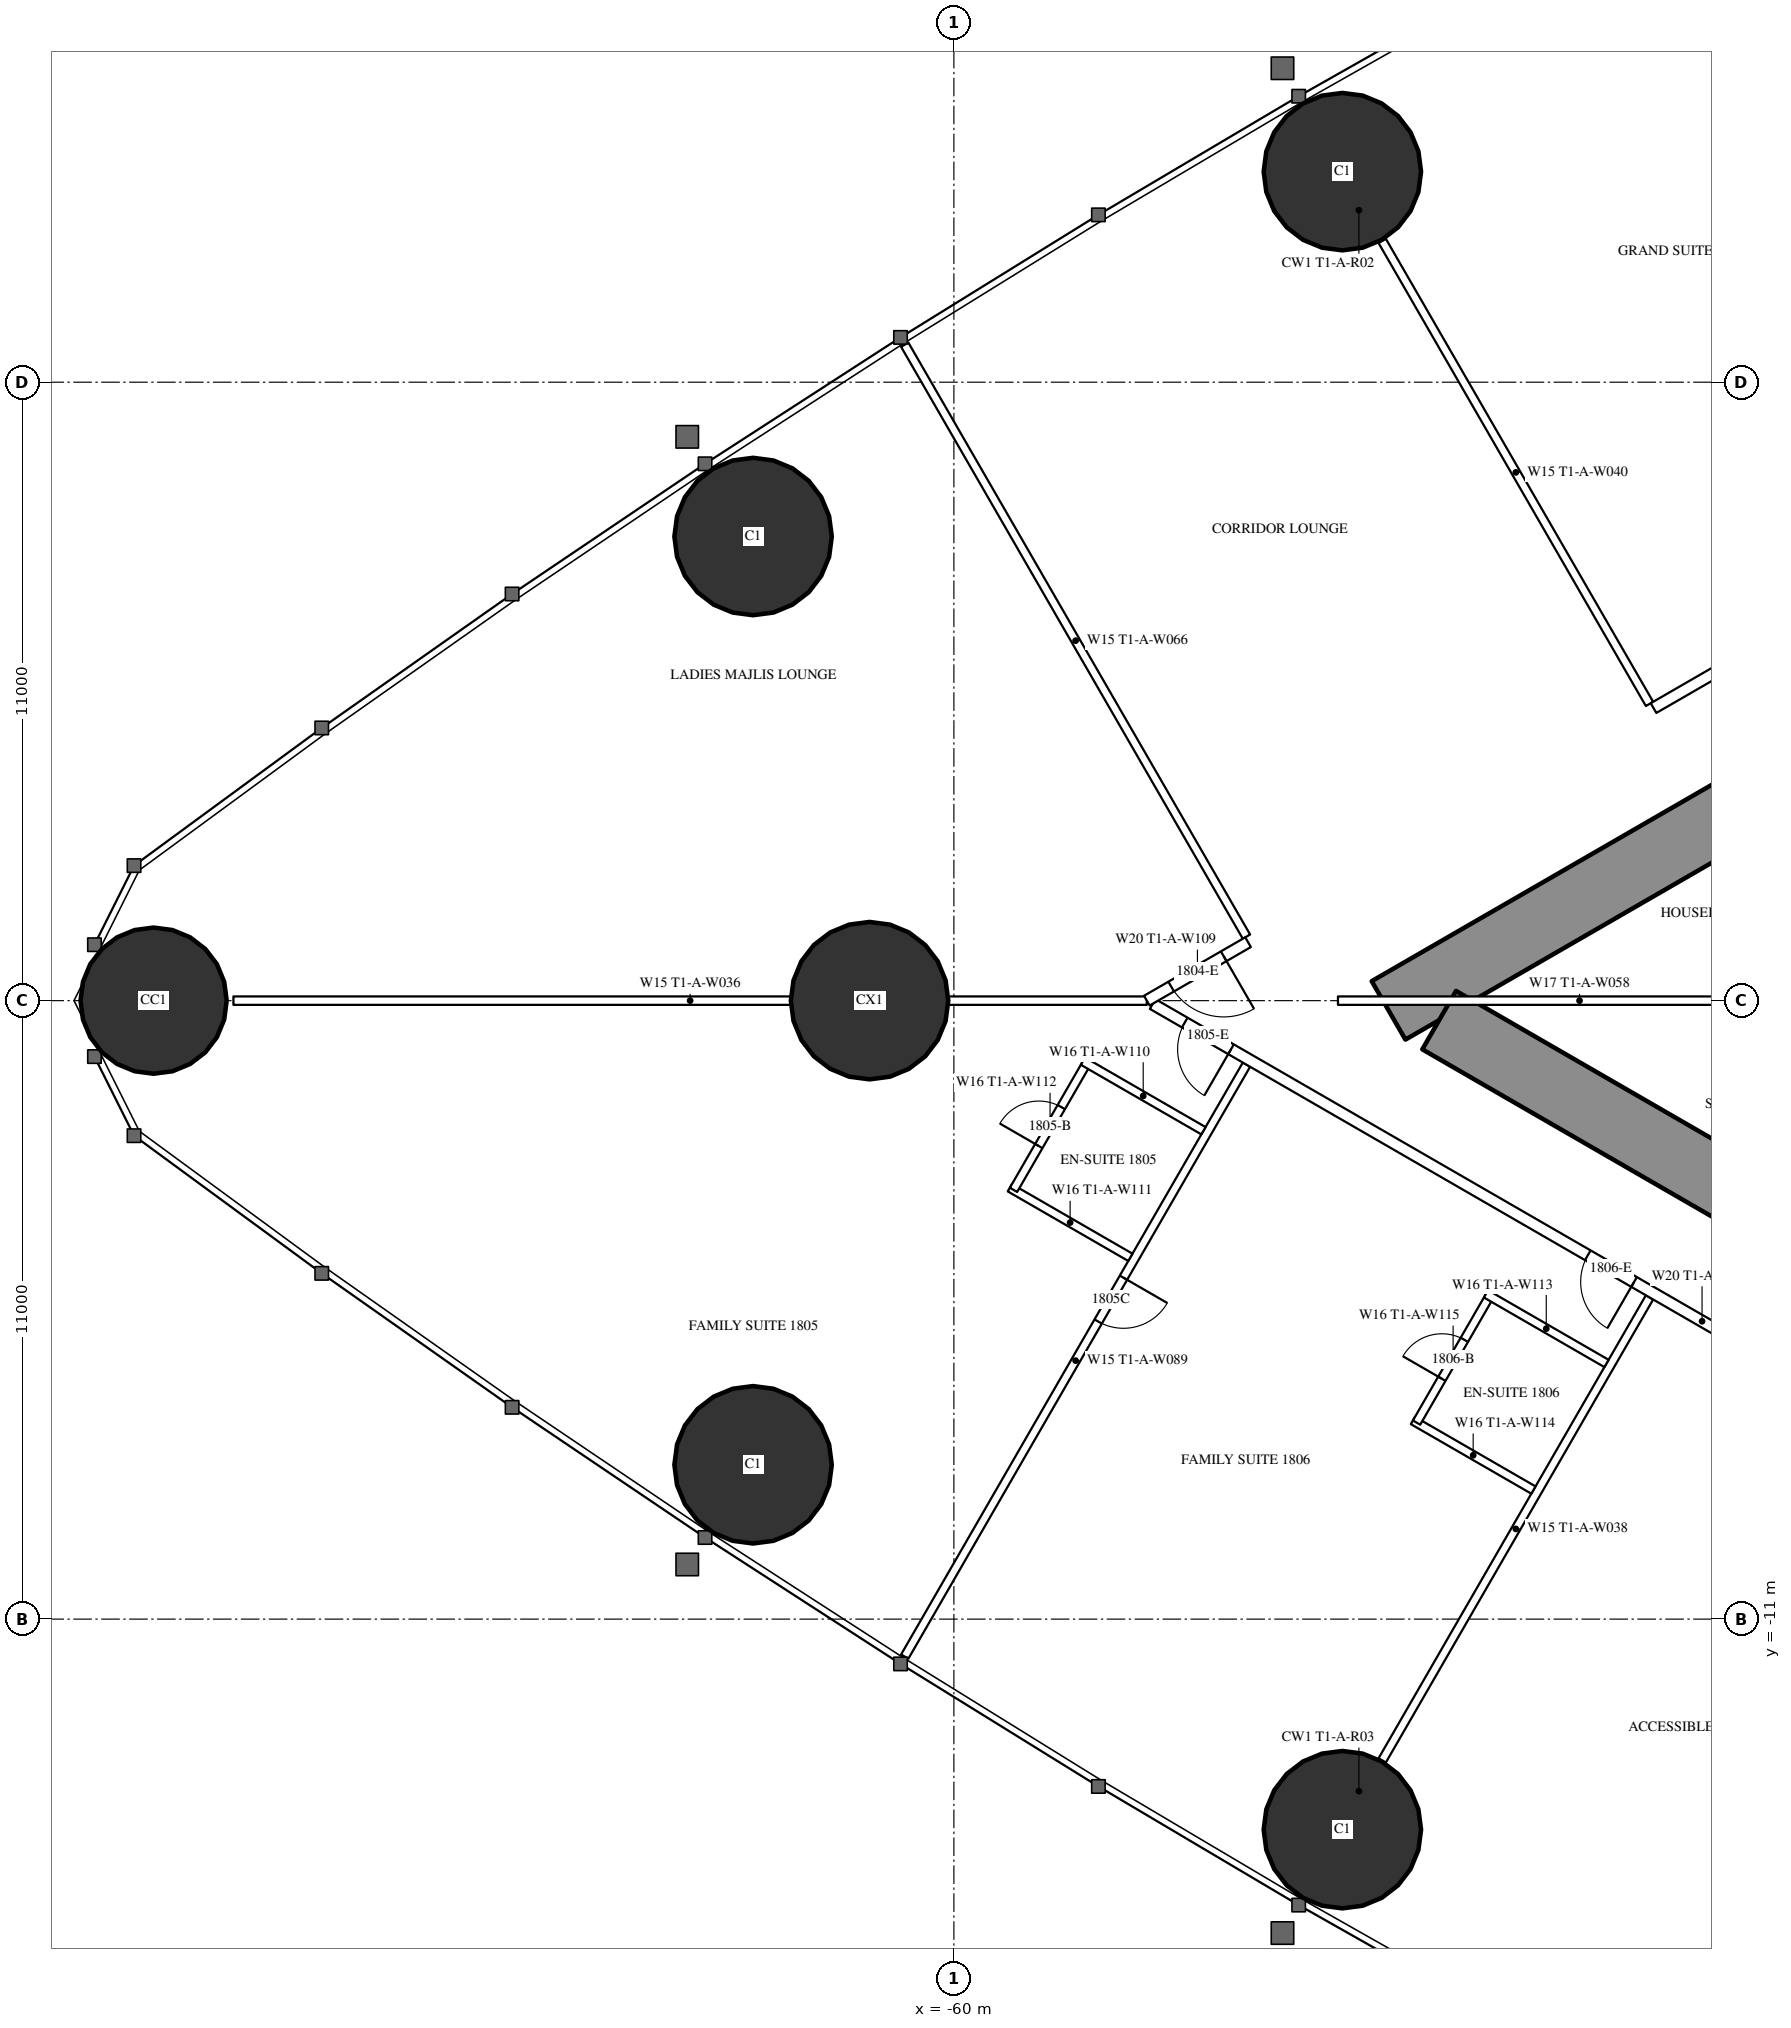
"""IFC4 building model, lengths in metres.
Left out: names, types, materials, properties, quantities, classifications, styles, units other than length and angle.
Written with IfcOpenShell. Run it as: python <this file> out.ifc"""

import sys

from ifc_helpers import new_model, si_unit, direction, frame, frame_2d, origin, origin_2d, place, context, subcontext, project, spatial, rectangle, hollow_circle, extrude, element, fill, save


model = new_model("IFC4")
c1 = context("Model", 3, precision=1e-05, world=origin(), true_north=direction((0.0, 1.0)))
c2 = subcontext(c1, "Body", "Model", "MODEL_VIEW")
j1 = project(units=[si_unit("LENGTHUNIT", "METRE"), si_unit("PLANEANGLEUNIT", "RADIAN")], contexts=[c1])
p1 = place(None, origin())
s1 = spatial("IfcSite", under=j1, at=p1, CompositionType="ELEMENT")
p2 = place(p1, origin())
s2 = spatial("IfcBuilding", under=s1, at=p2, CompositionType="ELEMENT")
p3 = place(p2, frame((0.0, 0.0, 70.5)))
s3 = spatial("IfcBuildingStorey", under=s2, at=p3, CompositionType="ELEMENT", Elevation=70.5)
p4 = place(p3, frame((-74.235, 0.0, 0.0), z_axis=(0.0, 0.0, 1.0), x_axis=(1.0, 0.0, 0.0)))
e1 = element("IfcColumn", 1, at=p4, inside=s3, PredefinedType="COLUMN", context=c2, shape_type="SweptSolid", body=[
    extrude(hollow_circle(Radius=1.3, WallThickness=0.1, at=origin_2d()), origin(), (0.0, 0.0, 1.0), 3.5),
])
for number, where, z_axis, x_axis in (
    (2, (-63.572, -8.255, 0.0), (0.0, 0.0, 1.0), (1.0, 0.0, 0.0)),
    (3, (-53.09, -14.745, 0.0), (0.0, 0.0, 1.0), (1.0, 0.0, 0.0)),
    (4, (-53.09, 14.745, 0.0), (0.0, 0.0, 1.0), (1.0, 0.0, 0.0)),
    (5, (-63.572, 8.255, 0.0), (0.0, 0.0, 1.0), (1.0, 0.0, 0.0)),
):
    element("IfcColumn", number, at=place(p3, frame(where, z_axis=z_axis, x_axis=x_axis)), inside=s3, PredefinedType="COLUMN", context=c2, shape_type="SweptSolid", body=[
        extrude(hollow_circle(Radius=1.4, WallThickness=0.12, at=origin_2d()), origin(), (0.0, 0.0, 1.0), 3.5),
    ])
p5 = place(p3, frame((-61.5, 0.0, 0.0), z_axis=(0.0, 0.0, 1.0), x_axis=(1.0, 0.0, 0.0)))
e6 = element("IfcColumn", 6, at=p5, inside=s3, PredefinedType="COLUMN", context=c2, shape_type="SweptSolid", body=[
    extrude(hollow_circle(Radius=1.4, WallThickness=0.1, at=origin_2d()), origin(), (0.0, 0.0, 1.0), 3.5),
])
p6 = place(p3, frame((-27.2, 14.3, 0.0), z_axis=(0.0, 0.0, 1.0), x_axis=(-0.866026593062, -0.499997940104, 0.0)))
e7 = element("IfcWall", 7, at=p6, inside=s3, PredefinedType="SHEAR", context=c2, shape_type="SweptSolid", body=[
    extrude(rectangle(XDim=28.946, YDim=1.2, at=frame_2d((14.473, 0.0))), origin(), (0.0, 0.0, 1.0), 3.5),
])
p7 = place(p6, frame((4.6, 0.0, 0.0)))
e8 = element("IfcOpeningElement", 8, at=p7, cuts=e7, PredefinedType="OPENING", context=c2, shape_type="SweptSolid", body=[
    extrude(rectangle(XDim=1.0, YDim=2.2, at=frame_2d((0.5, 1.1))), frame((0.0, 0.61, 0.0), z_axis=(0.0, -1.0, 0.0), x_axis=(1.0, 0.0, 0.0)), (0.0, 0.0, 1.0), 1.22),
])
p8 = place(p6, frame((13.395, 0.0, 0.0)))
e9 = element("IfcOpeningElement", 9, at=p8, cuts=e7, PredefinedType="OPENING", context=c2, shape_type="SweptSolid", body=[
    extrude(rectangle(XDim=1.8, YDim=2.2, at=frame_2d((0.9, 1.1))), frame((0.0, 0.61, 0.0), z_axis=(0.0, -1.0, 0.0), x_axis=(1.0, 0.0, 0.0)), (0.0, 0.0, 1.0), 1.22),
])
p9 = place(p3, frame((-27.2, -14.3, 0.0), z_axis=(0.0, 0.0, 1.0), x_axis=(-0.866024021859, 0.500002393557, 0.0)))
e10 = element("IfcWall", 10, at=p9, inside=s3, PredefinedType="SHEAR", context=c2, shape_type="SweptSolid", body=[
    extrude(rectangle(XDim=27.907, YDim=1.2, at=frame_2d((13.954, 0.0))), origin(), (0.0, 0.0, 1.0), 3.5),
])
p10 = place(p9, frame((4.6, 0.0, 0.0)))
e11 = element("IfcOpeningElement", 11, at=p10, cuts=e10, PredefinedType="OPENING", context=c2, shape_type="SweptSolid", body=[
    extrude(rectangle(XDim=1.0, YDim=2.2, at=frame_2d((0.5, 1.1))), frame((0.0, 0.61, 0.0), z_axis=(0.0, -1.0, 0.0), x_axis=(1.0, 0.0, 0.0)), (0.0, 0.0, 1.0), 1.22),
])
p11 = place(p9, frame((13.395, 0.0, 0.0)))
e12 = element("IfcOpeningElement", 12, at=p11, cuts=e10, PredefinedType="OPENING", context=c2, shape_type="SweptSolid", body=[
    extrude(rectangle(XDim=1.8, YDim=2.2, at=frame_2d((0.9, 1.1))), frame((0.0, 0.61, 0.0), z_axis=(0.0, -1.0, 0.0), x_axis=(1.0, 0.0, 0.0)), (0.0, 0.0, 1.0), 1.22),
])
p12 = place(p3, frame((-47.627, 5.278, 0.0), z_axis=(0.0, 0.0, 1.0), x_axis=(-0.500009844318, 0.86601972009, 0.0)))
e13 = element("IfcWall", 13, at=p12, inside=s3, PredefinedType="PARTITIONING", context=c2, shape_type="SweptSolid", body=[
    extrude(rectangle(XDim=9.51, YDim=0.15, at=frame_2d((4.755, 0.0))), origin(), (0.0, 0.0, 1.0), 2.25),
])
p13 = place(p3, frame((-54.796, 1.139, 0.0), z_axis=(0.0, 0.0, 1.0), x_axis=(-0.499998860433, 0.866026061713, 0.0)))
e14 = element("IfcWall", 14, at=p13, inside=s3, PredefinedType="PARTITIONING", context=c2, shape_type="SweptSolid", body=[
    extrude(rectangle(XDim=12.157, YDim=0.15, at=frame_2d((6.078, 0.0))), origin(), (0.0, 0.0, 1.0), 3.25),
])
p14 = place(p3, frame((-47.627, -5.278, 0.0), z_axis=(0.0, 0.0, 1.0), x_axis=(-0.500009844318, -0.86601972009, 0.0)))
e15 = element("IfcWall", 15, at=p14, inside=s3, PredefinedType="PARTITIONING", context=c2, shape_type="SweptSolid", body=[
    extrude(rectangle(XDim=9.51, YDim=0.15, at=frame_2d((4.755, 0.0))), origin(), (0.0, 0.0, 1.0), 2.25),
])
p15 = place(p3, frame((-54.796, -1.139, 0.0), z_axis=(0.0, 0.0, 1.0), x_axis=(-0.499998860433, -0.866026061713, 0.0)))
e16 = element("IfcWall", 16, at=p15, inside=s3, PredefinedType="PARTITIONING", context=c2, shape_type="SweptSolid", body=[
    extrude(rectangle(XDim=12.157, YDim=0.15, at=frame_2d((6.078, 0.0))), origin(), (0.0, 0.0, 1.0), 3.25),
])
p16 = place(p15, frame((4.375, 0.0, 0.0)))
e17 = element("IfcOpeningElement", 17, at=p16, cuts=e16, PredefinedType="OPENING", context=c2, shape_type="SweptSolid", body=[
    extrude(rectangle(XDim=0.9, YDim=2.2, at=frame_2d((0.45, 1.1))), frame((0.0, 0.085, 0.0), z_axis=(0.0, -1.0, 0.0), x_axis=(1.0, 0.0, 0.0)), (0.0, 0.0, 1.0), 0.17),
])
p17 = place(p3, frame((-56.568, 0.0, 0.0), z_axis=(0.0, 0.0, 1.0), x_axis=(-1.0, 0.0, 0.0)))
e18 = element("IfcWall", 18, at=p17, inside=s3, PredefinedType="PARTITIONING", context=c2, shape_type="SweptSolid", body=[
    extrude(rectangle(XDim=16.247, YDim=0.15, at=frame_2d((8.124, 0.0))), origin(), (0.0, 0.0, 1.0), 2.25),
])
p18 = place(p3, frame((-36.92, -11.344, 0.0), z_axis=(0.0, 0.0, 1.0), x_axis=(-0.866028313256, 0.499994960614, 0.0)))
e19 = element("IfcWall", 19, at=p18, inside=s3, PredefinedType="PARTITIONING", context=c2, shape_type="SweptSolid", body=[
    extrude(rectangle(XDim=22.568, YDim=0.2, at=frame_2d((11.284, 0.0))), origin(), (0.0, 0.0, 1.0), 3.25),
])
p19 = place(p18, frame((20.958, 0.0, 0.0)))
e20 = element("IfcOpeningElement", 20, at=p19, cuts=e19, PredefinedType="OPENING", context=c2, shape_type="SweptSolid", body=[
    extrude(rectangle(XDim=0.95, YDim=2.2, at=frame_2d((0.475, 1.1))), frame((0.0, 0.11, 0.0), z_axis=(0.0, -1.0, 0.0), x_axis=(1.0, 0.0, 0.0)), (0.0, 0.0, 1.0), 0.22),
])
p20 = place(p18, frame((12.68, 0.0, 0.0)))
e21 = element("IfcOpeningElement", 21, at=p20, cuts=e19, PredefinedType="OPENING", context=c2, shape_type="SweptSolid", body=[
    extrude(rectangle(XDim=0.95, YDim=2.2, at=frame_2d((0.475, 1.1))), frame((0.0, 0.11, 0.0), z_axis=(0.0, -1.0, 0.0), x_axis=(1.0, 0.0, 0.0)), (0.0, 0.0, 1.0), 0.22),
])
p21 = place(p18, frame((3.35, 0.0, 0.0)))
e22 = element("IfcOpeningElement", 22, at=p21, cuts=e19, PredefinedType="OPENING", context=c2, shape_type="SweptSolid", body=[
    extrude(rectangle(XDim=1.0, YDim=2.2, at=frame_2d((0.5, 1.1))), frame((0.0, 0.11, 0.0), z_axis=(0.0, -1.0, 0.0), x_axis=(1.0, 0.0, 0.0)), (0.0, 0.0, 1.0), 0.22),
])
p22 = place(p3, frame((-37.7, 10.894, 0.0), z_axis=(0.0, 0.0, 1.0), x_axis=(-0.866024459167, -0.500001636122, 0.0)))
e23 = element("IfcWall", 23, at=p22, inside=s3, PredefinedType="PARTITIONING", context=c2, shape_type="SweptSolid", body=[
    extrude(rectangle(XDim=11.38, YDim=0.2, at=frame_2d((5.69, 0.0))), origin(), (0.0, 0.0, 1.0), 3.25),
])
p23 = place(p22, frame((0.6, 0.0, 0.0)))
e24 = element("IfcOpeningElement", 24, at=p23, cuts=e23, PredefinedType="OPENING", context=c2, shape_type="SweptSolid", body=[
    extrude(rectangle(XDim=0.95, YDim=2.2, at=frame_2d((0.475, 1.1))), frame((0.0, 0.11, 0.0), z_axis=(0.0, -1.0, 0.0), x_axis=(1.0, 0.0, 0.0)), (0.0, 0.0, 1.0), 0.22),
])
p24 = place(p3, frame((-54.768, 1.04, 0.0), z_axis=(0.0, 0.0, 1.0), x_axis=(-0.866052632827, -0.499952834948, 0.0)))
e25 = element("IfcWall", 25, at=p24, inside=s3, PredefinedType="PARTITIONING", context=c2, shape_type="SweptSolid", body=[
    extrude(rectangle(XDim=2.079, YDim=0.2, at=frame_2d((1.04, 0.0))), origin(), (0.0, 0.0, 1.0), 3.25),
])
p25 = place(p24, frame((0.5, 0.0, 0.0)))
e26 = element("IfcOpeningElement", 26, at=p25, cuts=e25, PredefinedType="OPENING", context=c2, shape_type="SweptSolid", body=[
    extrude(rectangle(XDim=1.079, YDim=2.2, at=frame_2d((0.54, 1.1))), frame((0.0, 0.11, 0.0), z_axis=(0.0, -1.0, 0.0), x_axis=(1.0, 0.0, 0.0)), (0.0, 0.0, 1.0), 0.22),
])
p26 = place(p3, frame((-56.861, -4.565, 0.0), z_axis=(0.0, 0.0, 1.0), x_axis=(-0.86604923931, 0.499958713387, 0.0)))
e27 = element("IfcWall", 27, at=p26, inside=s3, PredefinedType="PARTITIONING", context=c2, shape_type="SweptSolid", body=[
    extrude(rectangle(XDim=2.475, YDim=0.15, at=frame_2d((1.237, 0.0))), origin(), (0.0, 0.0, 1.0), 3.25),
])
p27 = place(p3, frame((-57.639, -1.114, 0.0), z_axis=(0.0, 0.0, 1.0), x_axis=(-0.500006934395, -0.866021400173, 0.0)))
e28 = element("IfcWall", 28, at=p27, inside=s3, PredefinedType="PARTITIONING", context=c2, shape_type="SweptSolid", body=[
    extrude(rectangle(XDim=2.6, YDim=0.15, at=frame_2d((1.3, 0.0))), origin(), (0.0, 0.0, 1.0), 3.25),
])
p28 = place(p27, frame((0.9, 0.0, 0.0)))
e29 = element("IfcOpeningElement", 29, at=p28, cuts=e28, PredefinedType="OPENING", context=c2, shape_type="SweptSolid", body=[
    extrude(rectangle(XDim=0.8, YDim=2.2, at=frame_2d((0.4, 1.1))), frame((0.0, 0.085, 0.0), z_axis=(0.0, -1.0, 0.0), x_axis=(1.0, 0.0, 0.0)), (0.0, 0.0, 1.0), 0.17),
])
p29 = place(p3, frame((-55.561, -2.313, 0.0), z_axis=(0.0, 0.0, 1.0), x_axis=(-0.86604923931, 0.499958713387, 0.0)))
e30 = element("IfcWall", 30, at=p29, inside=s3, PredefinedType="PARTITIONING", context=c2, shape_type="SweptSolid", body=[
    extrude(rectangle(XDim=2.475, YDim=0.15, at=frame_2d((1.237, 0.0))), origin(), (0.0, 0.0, 1.0), 3.25),
])
p30 = place(p3, frame((-49.692, -8.704, 0.0), z_axis=(0.0, 0.0, 1.0), x_axis=(-0.866073894602, 0.499916002032, 0.0)))
e31 = element("IfcWall", 31, at=p30, inside=s3, PredefinedType="PARTITIONING", context=c2, shape_type="SweptSolid", body=[
    extrude(rectangle(XDim=2.475, YDim=0.15, at=frame_2d((1.238, 0.0))), origin(), (0.0, 0.0, 1.0), 3.25),
])
p31 = place(p3, frame((-50.47, -5.253, 0.0), z_axis=(0.0, 0.0, 1.0), x_axis=(-0.500006934395, -0.866021400173, 0.0)))
e32 = element("IfcWall", 32, at=p31, inside=s3, PredefinedType="PARTITIONING", context=c2, shape_type="SweptSolid", body=[
    extrude(rectangle(XDim=2.6, YDim=0.15, at=frame_2d((1.3, 0.0))), origin(), (0.0, 0.0, 1.0), 3.25),
])
p32 = place(p31, frame((0.9, 0.0, 0.0)))
e33 = element("IfcOpeningElement", 33, at=p32, cuts=e32, PredefinedType="OPENING", context=c2, shape_type="SweptSolid", body=[
    extrude(rectangle(XDim=0.8, YDim=2.2, at=frame_2d((0.4, 1.1))), frame((0.0, 0.085, 0.0), z_axis=(0.0, -1.0, 0.0), x_axis=(1.0, 0.0, 0.0)), (0.0, 0.0, 1.0), 0.17),
])
p33 = place(p3, frame((-48.392, -6.453, 0.0), z_axis=(0.0, 0.0, 1.0), x_axis=(-0.86604923931, 0.499958713387, 0.0)))
e34 = element("IfcWall", 34, at=p33, inside=s3, PredefinedType="PARTITIONING", context=c2, shape_type="SweptSolid", body=[
    extrude(rectangle(XDim=2.475, YDim=0.15, at=frame_2d((1.237, 0.0))), origin(), (0.0, 0.0, 1.0), 3.25),
])
p34 = place(p3, frame((-44.575, 0.0, 0.0), z_axis=(0.0, 0.0, 1.0), x_axis=(-1.0, 0.0, 0.0)))
e35 = element("IfcWall", 35, at=p34, inside=s3, PredefinedType="PARTITIONING", context=c2, shape_type="SweptSolid", body=[
    extrude(rectangle(XDim=8.593, YDim=0.15, at=frame_2d((4.297, 0.0))), origin(), (0.0, 0.0, 1.0), 2.25),
])
p35 = place(p25, origin())
e36 = element("IfcDoor", 36, at=p35, inside=s3, OperationType="SINGLE_SWING_LEFT", PredefinedType="DOOR", context=c2, shape_type="SweptSolid", body=[
    extrude(rectangle(XDim=1.079, YDim=2.2, at=frame_2d((0.54, 1.1))), frame((0.0, 0.025, 0.0), z_axis=(0.0, -1.0, 0.0), x_axis=(1.0, 0.0, 0.0)), (0.0, 0.0, 1.0), 0.05),
])
fill(e26, e36)
p36 = place(p28, origin())
e37 = element("IfcDoor", 37, at=p36, inside=s3, OperationType="SINGLE_SWING_RIGHT", PredefinedType="DOOR", context=c2, shape_type="SweptSolid", body=[
    extrude(rectangle(XDim=0.8, YDim=2.2, at=frame_2d((0.4, 1.1))), frame((0.0, 0.025, 0.0), z_axis=(0.0, -1.0, 0.0), x_axis=(1.0, 0.0, 0.0)), (0.0, 0.0, 1.0), 0.05),
])
fill(e29, e37)
p37 = place(p19, origin())
e38 = element("IfcDoor", 38, at=p37, inside=s3, OperationType="SINGLE_SWING_LEFT", PredefinedType="DOOR", context=c2, shape_type="SweptSolid", body=[
    extrude(rectangle(XDim=0.95, YDim=2.2, at=frame_2d((0.475, 1.1))), frame((0.0, 0.025, 0.0), z_axis=(0.0, -1.0, 0.0), x_axis=(1.0, 0.0, 0.0)), (0.0, 0.0, 1.0), 0.05),
])
fill(e20, e38)
p38 = place(p32, origin())
e39 = element("IfcDoor", 39, at=p38, inside=s3, OperationType="SINGLE_SWING_RIGHT", PredefinedType="DOOR", context=c2, shape_type="SweptSolid", body=[
    extrude(rectangle(XDim=0.8, YDim=2.2, at=frame_2d((0.4, 1.1))), frame((0.0, 0.025, 0.0), z_axis=(0.0, -1.0, 0.0), x_axis=(1.0, 0.0, 0.0)), (0.0, 0.0, 1.0), 0.05),
])
fill(e33, e39)
p39 = place(p20, origin())
e40 = element("IfcDoor", 40, at=p39, inside=s3, OperationType="SINGLE_SWING_LEFT", PredefinedType="DOOR", context=c2, shape_type="SweptSolid", body=[
    extrude(rectangle(XDim=0.95, YDim=2.2, at=frame_2d((0.475, 1.1))), frame((0.0, 0.025, 0.0), z_axis=(0.0, -1.0, 0.0), x_axis=(1.0, 0.0, 0.0)), (0.0, 0.0, 1.0), 0.05),
])
fill(e21, e40)
p40 = place(p16, origin())
e41 = element("IfcDoor", 41, at=p40, inside=s3, OperationType="SINGLE_SWING_LEFT", PredefinedType="DOOR", context=c2, shape_type="SweptSolid", body=[
    extrude(rectangle(XDim=0.9, YDim=2.2, at=frame_2d((0.45, 1.1))), frame((0.0, 0.025, 0.0), z_axis=(0.0, -1.0, 0.0), x_axis=(1.0, 0.0, 0.0)), (0.0, 0.0, 1.0), 0.05),
])
fill(e17, e41)
save(model, sys.argv[1])
